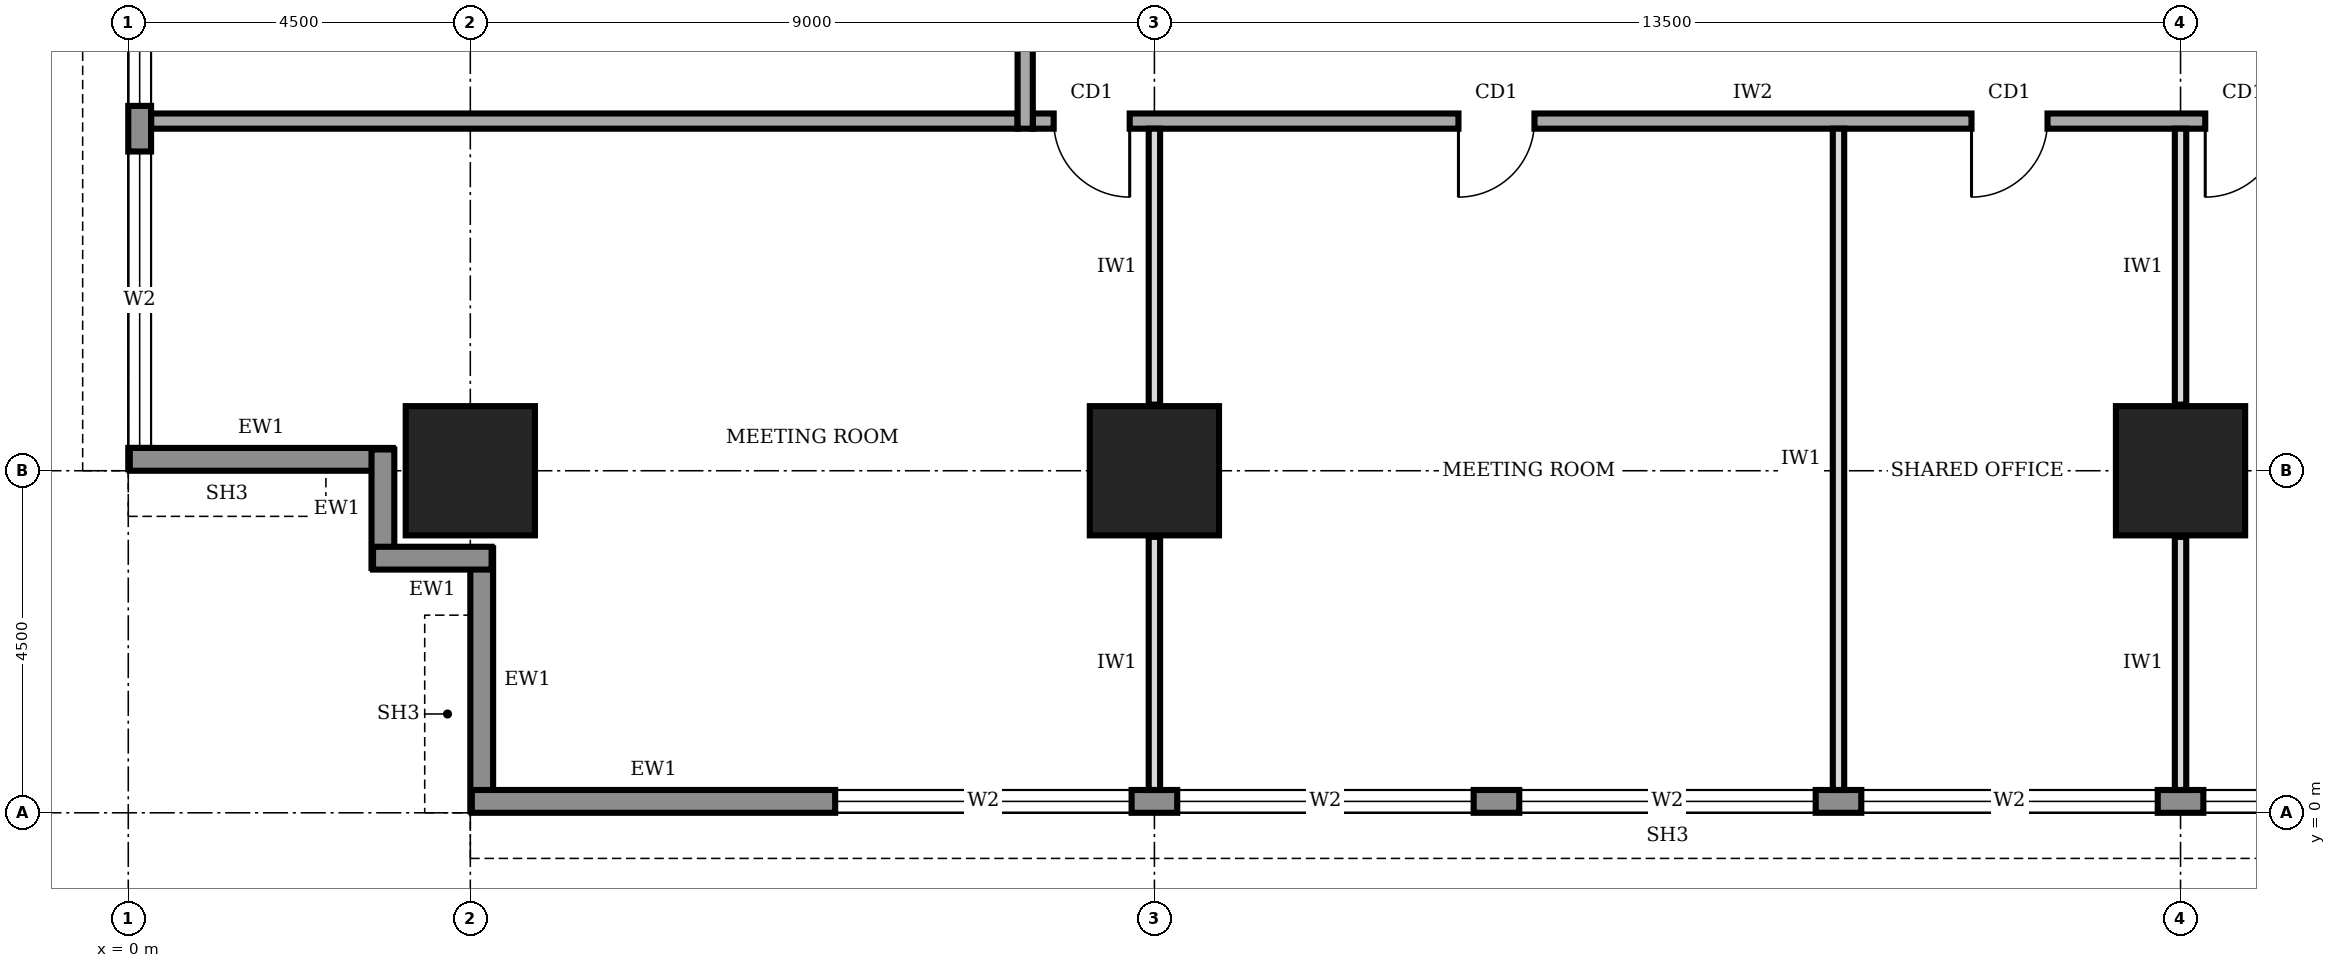
"""IFC4 building model, lengths in metres.
Left out: names, types, materials, properties, quantities, classifications, styles, units other than length and angle.
Written with IfcOpenShell. Run it as: python <this file> out.ifc"""

import sys

from ifc_helpers import new_model, si_unit, direction, frame, frame_2d, origin, origin_2d, place, context, subcontext, project, spatial, rectangle, extrude, element, fill, save


model = new_model("IFC4")
c1 = context("Model", 3, precision=1e-05, world=origin(), true_north=direction((0.0, 1.0)))
c2 = subcontext(c1, "Body", "Model", "MODEL_VIEW")
j1 = project(units=[si_unit("LENGTHUNIT", "METRE"), si_unit("PLANEANGLEUNIT", "RADIAN")], contexts=[c1])
p1 = place(None, origin())
s1 = spatial("IfcSite", under=j1, at=p1, CompositionType="ELEMENT")
p2 = place(p1, origin())
s2 = spatial("IfcBuilding", under=s1, at=p2, CompositionType="ELEMENT")
p3 = place(p2, frame((0.0, 0.0, 137.0)))
s3 = spatial("IfcBuildingStorey", under=s2, at=p3, CompositionType="ELEMENT", Elevation=137.0)
for number, where, z_axis, x_axis in (
    (1, (4.5, 4.5, 0.0), (0.0, 0.0, 1.0), (1.0, 0.0, 0.0)),
    (2, (13.5, 4.5, 0.0), (0.0, 0.0, 1.0), (1.0, 0.0, 0.0)),
    (3, (27.0, 4.5, 0.0), (0.0, 0.0, 1.0), (1.0, 0.0, 0.0)),
):
    element("IfcColumn", number, at=place(p3, frame(where, z_axis=z_axis, x_axis=x_axis)), inside=s3, PredefinedType="COLUMN", context=c2, shape_type="SweptSolid", body=[
        extrude(rectangle(XDim=1.7, YDim=1.7, at=origin_2d()), origin(), (0.0, 0.0, 1.0), 4.0),
    ])
p4 = place(p3, frame((4.65, 3.48, 0.0), z_axis=(0.0, 0.0, 1.0), x_axis=(0.0, -1.0, 0.0)))
e4 = element("IfcWall", 4, at=p4, inside=s3, PredefinedType="STANDARD", context=c2, shape_type="SweptSolid", body=[
    extrude(rectangle(XDim=3.46, YDim=0.3, at=frame_2d((1.73, 0.0))), origin(), (0.0, 0.0, 1.0), 2.85),
])
p5 = place(p3, frame((4.52, 0.15, 0.0), z_axis=(0.0, 0.0, 1.0), x_axis=(1.0, 0.0, 0.0)))
e5 = element("IfcWall", 5, at=p5, inside=s3, PredefinedType="STANDARD", context=c2, shape_type="SweptSolid", body=[
    extrude(rectangle(XDim=31.46, YDim=0.3, at=frame_2d((15.73, 0.0))), origin(), (0.0, 0.0, 1.0), 3.75),
])
p6 = place(p5, frame((4.78, 0.0, 0.6)))
e6 = element("IfcOpeningElement", 6, at=p6, cuts=e5, PredefinedType="OPENING", context=c2, shape_type="SweptSolid", body=[
    extrude(rectangle(XDim=3.9, YDim=2.6, at=frame_2d((1.95, 1.3))), frame((0.0, 0.16, 0.0), z_axis=(0.0, -1.0, 0.0), x_axis=(1.0, 0.0, 0.0)), (0.0, 0.0, 1.0), 0.32),
])
p7 = place(p5, frame((9.28, 0.0, 0.6)))
e7 = element("IfcOpeningElement", 7, at=p7, cuts=e5, PredefinedType="OPENING", context=c2, shape_type="SweptSolid", body=[
    extrude(rectangle(XDim=3.9, YDim=2.6, at=frame_2d((1.95, 1.3))), frame((0.0, 0.16, 0.0), z_axis=(0.0, -1.0, 0.0), x_axis=(1.0, 0.0, 0.0)), (0.0, 0.0, 1.0), 0.32),
])
p8 = place(p5, frame((13.78, 0.0, 0.6)))
e8 = element("IfcOpeningElement", 8, at=p8, cuts=e5, PredefinedType="OPENING", context=c2, shape_type="SweptSolid", body=[
    extrude(rectangle(XDim=3.9, YDim=2.6, at=frame_2d((1.95, 1.3))), frame((0.0, 0.16, 0.0), z_axis=(0.0, -1.0, 0.0), x_axis=(1.0, 0.0, 0.0)), (0.0, 0.0, 1.0), 0.32),
])
p9 = place(p5, frame((18.28, 0.0, 0.6)))
e9 = element("IfcOpeningElement", 9, at=p9, cuts=e5, PredefinedType="OPENING", context=c2, shape_type="SweptSolid", body=[
    extrude(rectangle(XDim=3.9, YDim=2.6, at=frame_2d((1.95, 1.3))), frame((0.0, 0.16, 0.0), z_axis=(0.0, -1.0, 0.0), x_axis=(1.0, 0.0, 0.0)), (0.0, 0.0, 1.0), 0.32),
])
p10 = place(p5, frame((22.78, 0.0, 0.6)))
e10 = element("IfcOpeningElement", 10, at=p10, cuts=e5, PredefinedType="OPENING", context=c2, shape_type="SweptSolid", body=[
    extrude(rectangle(XDim=3.9, YDim=2.6, at=frame_2d((1.95, 1.3))), frame((0.0, 0.16, 0.0), z_axis=(0.0, -1.0, 0.0), x_axis=(1.0, 0.0, 0.0)), (0.0, 0.0, 1.0), 0.32),
])
p11 = place(p5, frame((27.28, 0.0, 0.6)))
e11 = element("IfcOpeningElement", 11, at=p11, cuts=e5, PredefinedType="OPENING", context=c2, shape_type="SweptSolid", body=[
    extrude(rectangle(XDim=3.9, YDim=2.6, at=frame_2d((1.95, 1.3))), frame((0.0, 0.16, 0.0), z_axis=(0.0, -1.0, 0.0), x_axis=(1.0, 0.0, 0.0)), (0.0, 0.0, 1.0), 0.32),
])
p12 = place(p3, frame((0.15, 35.98, 0.0), z_axis=(0.0, 0.0, 1.0), x_axis=(0.0, -1.0, 0.0)))
e12 = element("IfcWall", 12, at=p12, inside=s3, PredefinedType="STANDARD", context=c2, shape_type="SweptSolid", body=[
    extrude(rectangle(XDim=31.46, YDim=0.3, at=frame_2d((15.73, 0.0))), origin(), (0.0, 0.0, 1.0), 3.75),
])
p13 = place(p12, frame((27.28, 0.0, 0.6)))
e13 = element("IfcOpeningElement", 13, at=p13, cuts=e12, PredefinedType="OPENING", context=c2, shape_type="SweptSolid", body=[
    extrude(rectangle(XDim=3.9, YDim=2.6, at=frame_2d((1.95, 1.3))), frame((0.0, 0.16, 0.0), z_axis=(0.0, -1.0, 0.0), x_axis=(1.0, 0.0, 0.0)), (0.0, 0.0, 1.0), 0.32),
])
p14 = place(p12, frame((22.78, 0.0, 0.6)))
e14 = element("IfcOpeningElement", 14, at=p14, cuts=e12, PredefinedType="OPENING", context=c2, shape_type="SweptSolid", body=[
    extrude(rectangle(XDim=3.9, YDim=2.6, at=frame_2d((1.95, 1.3))), frame((0.0, 0.16, 0.0), z_axis=(0.0, -1.0, 0.0), x_axis=(1.0, 0.0, 0.0)), (0.0, 0.0, 1.0), 0.32),
])
p15 = place(p12, frame((18.28, 0.0, 0.6)))
e15 = element("IfcOpeningElement", 15, at=p15, cuts=e12, PredefinedType="OPENING", context=c2, shape_type="SweptSolid", body=[
    extrude(rectangle(XDim=3.9, YDim=2.6, at=frame_2d((1.95, 1.3))), frame((0.0, 0.16, 0.0), z_axis=(0.0, -1.0, 0.0), x_axis=(1.0, 0.0, 0.0)), (0.0, 0.0, 1.0), 0.32),
])
p16 = place(p12, frame((13.78, 0.0, 0.6)))
e16 = element("IfcOpeningElement", 16, at=p16, cuts=e12, PredefinedType="OPENING", context=c2, shape_type="SweptSolid", body=[
    extrude(rectangle(XDim=3.9, YDim=2.6, at=frame_2d((1.95, 1.3))), frame((0.0, 0.16, 0.0), z_axis=(0.0, -1.0, 0.0), x_axis=(1.0, 0.0, 0.0)), (0.0, 0.0, 1.0), 0.32),
])
p17 = place(p12, frame((9.28, 0.0, 0.6)))
e17 = element("IfcOpeningElement", 17, at=p17, cuts=e12, PredefinedType="OPENING", context=c2, shape_type="SweptSolid", body=[
    extrude(rectangle(XDim=3.9, YDim=2.6, at=frame_2d((1.95, 1.3))), frame((0.0, 0.16, 0.0), z_axis=(0.0, -1.0, 0.0), x_axis=(1.0, 0.0, 0.0)), (0.0, 0.0, 1.0), 0.32),
])
p18 = place(p12, frame((4.78, 0.0, 0.6)))
e18 = element("IfcOpeningElement", 18, at=p18, cuts=e12, PredefinedType="OPENING", context=c2, shape_type="SweptSolid", body=[
    extrude(rectangle(XDim=3.9, YDim=2.6, at=frame_2d((1.95, 1.3))), frame((0.0, 0.16, 0.0), z_axis=(0.0, -1.0, 0.0), x_axis=(1.0, 0.0, 0.0)), (0.0, 0.0, 1.0), 0.32),
])
p19 = place(p3, frame((0.02, 4.65, 0.0), z_axis=(0.0, 0.0, 1.0), x_axis=(1.0, 0.0, 0.0)))
e19 = element("IfcWall", 19, at=p19, inside=s3, PredefinedType="STANDARD", context=c2, shape_type="SweptSolid", body=[
    extrude(rectangle(XDim=3.46, YDim=0.3, at=frame_2d((1.73, 0.0))), origin(), (0.0, 0.0, 1.0), 2.85),
])
for number, where, z_axis, x_axis in (
    (20, (3.35, 4.78, 0.0), (0.0, 0.0, 1.0), (0.0, -1.0, 0.0)),
    (21, (3.22, 3.35, 0.0), (0.0, 0.0, 1.0), (1.0, 0.0, 0.0)),
):
    element("IfcWall", number, at=place(p3, frame(where, z_axis=z_axis, x_axis=x_axis)), inside=s3, PredefinedType="STANDARD", context=c2, shape_type="SweptSolid", body=[
        extrude(rectangle(XDim=1.56, YDim=0.3, at=frame_2d((0.78, 0.0))), origin(), (0.0, 0.0, 1.0), 3.75),
    ])
p20 = place(p3, frame((11.9, 9.1, 0.0), z_axis=(0.0, 0.0, 1.0), x_axis=(1.0, 0.0, 0.0)))
e22 = element("IfcWall", 22, at=p20, inside=s3, PredefinedType="SOLIDWALL", context=c2, shape_type="SweptSolid", body=[
    extrude(rectangle(XDim=16.9, YDim=0.2, at=frame_2d((8.45, 0.0))), origin(), (0.0, 0.0, 1.0), 3.75),
])
p21 = place(p20, frame((0.275, 0.0, 0.0)))
e23 = element("IfcOpeningElement", 23, at=p21, cuts=e22, PredefinedType="OPENING", context=c2, shape_type="SweptSolid", body=[
    extrude(rectangle(XDim=1.0, YDim=2.1, at=frame_2d((0.5, 1.05))), frame((0.0, 0.11, 0.0), z_axis=(0.0, -1.0, 0.0), x_axis=(1.0, 0.0, 0.0)), (0.0, 0.0, 1.0), 0.22),
])
p22 = place(p20, frame((5.6, 0.0, 0.0)))
e24 = element("IfcOpeningElement", 24, at=p22, cuts=e22, PredefinedType="OPENING", context=c2, shape_type="SweptSolid", body=[
    extrude(rectangle(XDim=1.0, YDim=2.1, at=frame_2d((0.5, 1.05))), frame((0.0, 0.11, 0.0), z_axis=(0.0, -1.0, 0.0), x_axis=(1.0, 0.0, 0.0)), (0.0, 0.0, 1.0), 0.22),
])
p23 = place(p20, frame((12.35, 0.0, 0.0)))
e25 = element("IfcOpeningElement", 25, at=p23, cuts=e22, PredefinedType="OPENING", context=c2, shape_type="SweptSolid", body=[
    extrude(rectangle(XDim=1.0, YDim=2.1, at=frame_2d((0.5, 1.05))), frame((0.0, 0.11, 0.0), z_axis=(0.0, -1.0, 0.0), x_axis=(1.0, 0.0, 0.0)), (0.0, 0.0, 1.0), 0.22),
])
p24 = place(p20, frame((15.425, 0.0, 0.0)))
e26 = element("IfcOpeningElement", 26, at=p24, cuts=e22, PredefinedType="OPENING", context=c2, shape_type="SweptSolid", body=[
    extrude(rectangle(XDim=1.0, YDim=2.1, at=frame_2d((0.5, 1.05))), frame((0.0, 0.11, 0.0), z_axis=(0.0, -1.0, 0.0), x_axis=(1.0, 0.0, 0.0)), (0.0, 0.0, 1.0), 0.22),
])
p25 = place(p3, frame((11.8, 31.3, 0.0), z_axis=(0.0, 0.0, 1.0), x_axis=(0.0, -1.0, 0.0)))
e27 = element("IfcWall", 27, at=p25, inside=s3, PredefinedType="SOLIDWALL", context=c2, shape_type="SweptSolid", body=[
    extrude(rectangle(XDim=22.3, YDim=0.2, at=frame_2d((11.15, 0.0))), origin(), (0.0, 0.0, 1.0), 3.75),
])
p26 = place(p25, frame((19.55, 0.0, 0.0)))
e28 = element("IfcOpeningElement", 28, at=p26, cuts=e27, PredefinedType="OPENING", context=c2, shape_type="SweptSolid", body=[
    extrude(rectangle(XDim=1.0, YDim=2.1, at=frame_2d((0.5, 1.05))), frame((0.0, 0.11, 0.0), z_axis=(0.0, -1.0, 0.0), x_axis=(1.0, 0.0, 0.0)), (0.0, 0.0, 1.0), 0.22),
])
p27 = place(p25, frame((15.45, 0.0, 0.0)))
e29 = element("IfcOpeningElement", 29, at=p27, cuts=e27, PredefinedType="OPENING", context=c2, shape_type="SweptSolid", body=[
    extrude(rectangle(XDim=0.9, YDim=2.1, at=frame_2d((0.45, 1.05))), frame((0.0, 0.11, 0.0), z_axis=(0.0, -1.0, 0.0), x_axis=(1.0, 0.0, 0.0)), (0.0, 0.0, 1.0), 0.22),
])
p28 = place(p25, frame((12.45, 0.0, 0.0)))
e30 = element("IfcOpeningElement", 30, at=p28, cuts=e27, PredefinedType="OPENING", context=c2, shape_type="SweptSolid", body=[
    extrude(rectangle(XDim=0.9, YDim=2.1, at=frame_2d((0.45, 1.05))), frame((0.0, 0.11, 0.0), z_axis=(0.0, -1.0, 0.0), x_axis=(1.0, 0.0, 0.0)), (0.0, 0.0, 1.0), 0.22),
])
p29 = place(p25, frame((7.6, 0.0, 0.0)))
e31 = element("IfcOpeningElement", 31, at=p29, cuts=e27, PredefinedType="OPENING", context=c2, shape_type="SweptSolid", body=[
    extrude(rectangle(XDim=0.9, YDim=2.1, at=frame_2d((0.45, 1.05))), frame((0.0, 0.11, 0.0), z_axis=(0.0, -1.0, 0.0), x_axis=(1.0, 0.0, 0.0)), (0.0, 0.0, 1.0), 0.22),
])
p30 = place(p25, frame((4.8, 0.0, 0.0)))
e32 = element("IfcOpeningElement", 32, at=p30, cuts=e27, PredefinedType="OPENING", context=c2, shape_type="SweptSolid", body=[
    extrude(rectangle(XDim=1.0, YDim=2.1, at=frame_2d((0.5, 1.05))), frame((0.0, 0.11, 0.0), z_axis=(0.0, -1.0, 0.0), x_axis=(1.0, 0.0, 0.0)), (0.0, 0.0, 1.0), 0.22),
])
p31 = place(p25, frame((10.3, 0.0, 0.0)))
e33 = element("IfcOpeningElement", 33, at=p31, cuts=e27, PredefinedType="OPENING", context=c2, shape_type="SweptSolid", body=[
    extrude(rectangle(XDim=1.0, YDim=2.1, at=frame_2d((0.5, 1.05))), frame((0.0, 0.11, 0.0), z_axis=(0.0, -1.0, 0.0), x_axis=(1.0, 0.0, 0.0)), (0.0, 0.0, 1.0), 0.22),
])
p32 = place(p25, frame((1.55, 0.0, 0.0)))
e34 = element("IfcOpeningElement", 34, at=p32, cuts=e27, PredefinedType="OPENING", context=c2, shape_type="SweptSolid", body=[
    extrude(rectangle(XDim=1.0, YDim=2.1, at=frame_2d((0.5, 1.05))), frame((0.0, 0.11, 0.0), z_axis=(0.0, -1.0, 0.0), x_axis=(1.0, 0.0, 0.0)), (0.0, 0.0, 1.0), 0.22),
])
p33 = place(p3, frame((0.3, 9.1, 0.0), z_axis=(0.0, 0.0, 1.0), x_axis=(1.0, 0.0, 0.0)))
e35 = element("IfcWall", 35, at=p33, inside=s3, PredefinedType="SOLIDWALL", context=c2, shape_type="SweptSolid", body=[
    extrude(rectangle(XDim=11.4, YDim=0.2, at=frame_2d((5.7, 0.0))), origin(), (0.0, 0.0, 1.0), 3.75),
])
p34 = place(p3, frame((13.5, 0.3, 0.0), z_axis=(0.0, 0.0, 1.0), x_axis=(0.0, 1.0, 0.0)))
e36 = element("IfcWall", 36, at=p34, inside=s3, PredefinedType="PARTITIONING", context=c2, shape_type="SweptSolid", body=[
    extrude(rectangle(XDim=3.33, YDim=0.15, at=frame_2d((1.665, 0.0))), origin(), (0.0, 0.0, 1.0), 2.85),
])
p35 = place(p3, frame((13.5, 5.37, 0.0), z_axis=(0.0, 0.0, 1.0), x_axis=(0.0, 1.0, 0.0)))
e37 = element("IfcWall", 37, at=p35, inside=s3, PredefinedType="PARTITIONING", context=c2, shape_type="SweptSolid", body=[
    extrude(rectangle(XDim=3.63, YDim=0.15, at=frame_2d((1.815, 0.0))), origin(), (0.0, 0.0, 1.0), 2.85),
])
p36 = place(p3, frame((22.5, 0.3, 0.0), z_axis=(0.0, 0.0, 1.0), x_axis=(0.0, 1.0, 0.0)))
e38 = element("IfcWall", 38, at=p36, inside=s3, PredefinedType="PARTITIONING", context=c2, shape_type="SweptSolid", body=[
    extrude(rectangle(XDim=8.7, YDim=0.15, at=frame_2d((4.35, 0.0))), origin(), (0.0, 0.0, 1.0), 3.75),
])
p37 = place(p3, frame((27.0, 0.3, 0.0), z_axis=(0.0, 0.0, 1.0), x_axis=(0.0, 1.0, 0.0)))
e39 = element("IfcWall", 39, at=p37, inside=s3, PredefinedType="PARTITIONING", context=c2, shape_type="SweptSolid", body=[
    extrude(rectangle(XDim=3.33, YDim=0.15, at=frame_2d((1.665, 0.0))), origin(), (0.0, 0.0, 1.0), 2.85),
])
p38 = place(p3, frame((27.0, 5.37, 0.0), z_axis=(0.0, 0.0, 1.0), x_axis=(0.0, 1.0, 0.0)))
e40 = element("IfcWall", 40, at=p38, inside=s3, PredefinedType="PARTITIONING", context=c2, shape_type="SweptSolid", body=[
    extrude(rectangle(XDim=3.63, YDim=0.15, at=frame_2d((1.815, 0.0))), origin(), (0.0, 0.0, 1.0), 2.85),
])
p39 = place(p6, origin())
e41 = element("IfcWindow", 41, at=p39, inside=s3, PartitioningType="SINGLE_PANEL", PredefinedType="WINDOW", context=c2, shape_type="SweptSolid", body=[
    extrude(rectangle(XDim=3.9, YDim=2.6, at=frame_2d((1.95, 1.3))), frame((0.0, 0.03, 0.0), z_axis=(0.0, -1.0, 0.0), x_axis=(1.0, 0.0, 0.0)), (0.0, 0.0, 1.0), 0.06),
])
fill(e6, e41)
p40 = place(p7, origin())
e42 = element("IfcWindow", 42, at=p40, inside=s3, PartitioningType="SINGLE_PANEL", PredefinedType="WINDOW", context=c2, shape_type="SweptSolid", body=[
    extrude(rectangle(XDim=3.9, YDim=2.6, at=frame_2d((1.95, 1.3))), frame((0.0, 0.03, 0.0), z_axis=(0.0, -1.0, 0.0), x_axis=(1.0, 0.0, 0.0)), (0.0, 0.0, 1.0), 0.06),
])
fill(e7, e42)
p41 = place(p8, origin())
e43 = element("IfcWindow", 43, at=p41, inside=s3, PartitioningType="SINGLE_PANEL", PredefinedType="WINDOW", context=c2, shape_type="SweptSolid", body=[
    extrude(rectangle(XDim=3.9, YDim=2.6, at=frame_2d((1.95, 1.3))), frame((0.0, 0.03, 0.0), z_axis=(0.0, -1.0, 0.0), x_axis=(1.0, 0.0, 0.0)), (0.0, 0.0, 1.0), 0.06),
])
fill(e8, e43)
p42 = place(p9, origin())
e44 = element("IfcWindow", 44, at=p42, inside=s3, PartitioningType="SINGLE_PANEL", PredefinedType="WINDOW", context=c2, shape_type="SweptSolid", body=[
    extrude(rectangle(XDim=3.9, YDim=2.6, at=frame_2d((1.95, 1.3))), frame((0.0, 0.03, 0.0), z_axis=(0.0, -1.0, 0.0), x_axis=(1.0, 0.0, 0.0)), (0.0, 0.0, 1.0), 0.06),
])
fill(e9, e44)
p43 = place(p10, origin())
e45 = element("IfcWindow", 45, at=p43, inside=s3, PartitioningType="SINGLE_PANEL", PredefinedType="WINDOW", context=c2, shape_type="SweptSolid", body=[
    extrude(rectangle(XDim=3.9, YDim=2.6, at=frame_2d((1.95, 1.3))), frame((0.0, 0.03, 0.0), z_axis=(0.0, -1.0, 0.0), x_axis=(1.0, 0.0, 0.0)), (0.0, 0.0, 1.0), 0.06),
])
fill(e10, e45)
p44 = place(p13, origin())
e46 = element("IfcWindow", 46, at=p44, inside=s3, PartitioningType="SINGLE_PANEL", PredefinedType="WINDOW", context=c2, shape_type="SweptSolid", body=[
    extrude(rectangle(XDim=3.9, YDim=2.6, at=frame_2d((1.95, 1.3))), frame((0.0, 0.03, 0.0), z_axis=(0.0, -1.0, 0.0), x_axis=(1.0, 0.0, 0.0)), (0.0, 0.0, 1.0), 0.06),
])
fill(e13, e46)
p45 = place(p14, origin())
e47 = element("IfcWindow", 47, at=p45, inside=s3, PartitioningType="SINGLE_PANEL", PredefinedType="WINDOW", context=c2, shape_type="SweptSolid", body=[
    extrude(rectangle(XDim=3.9, YDim=2.6, at=frame_2d((1.95, 1.3))), frame((0.0, 0.03, 0.0), z_axis=(0.0, -1.0, 0.0), x_axis=(1.0, 0.0, 0.0)), (0.0, 0.0, 1.0), 0.06),
])
fill(e14, e47)
p46 = place(p21, frame((1.0, 0.0, 0.0), z_axis=(0.0, 0.0, 1.0), x_axis=(-1.0, 0.0, 0.0)))
e48 = element("IfcDoor", 48, at=p46, inside=s3, OperationType="SINGLE_SWING_LEFT", PredefinedType="DOOR", context=c2, shape_type="SweptSolid", body=[
    extrude(rectangle(XDim=1.0, YDim=2.1, at=frame_2d((0.5, 1.05))), frame((0.0, 0.025, 0.0), z_axis=(0.0, -1.0, 0.0), x_axis=(1.0, 0.0, 0.0)), (0.0, 0.0, 1.0), 0.05),
])
fill(e23, e48)
p47 = place(p22, frame((1.0, 0.0, 0.0), z_axis=(0.0, 0.0, 1.0), x_axis=(-1.0, 0.0, 0.0)))
e49 = element("IfcDoor", 49, at=p47, inside=s3, OperationType="SINGLE_SWING_RIGHT", PredefinedType="DOOR", context=c2, shape_type="SweptSolid", body=[
    extrude(rectangle(XDim=1.0, YDim=2.1, at=frame_2d((0.5, 1.05))), frame((0.0, 0.025, 0.0), z_axis=(0.0, -1.0, 0.0), x_axis=(1.0, 0.0, 0.0)), (0.0, 0.0, 1.0), 0.05),
])
fill(e24, e49)
p48 = place(p23, frame((1.0, 0.0, 0.0), z_axis=(0.0, 0.0, 1.0), x_axis=(-1.0, 0.0, 0.0)))
e50 = element("IfcDoor", 50, at=p48, inside=s3, OperationType="SINGLE_SWING_RIGHT", PredefinedType="DOOR", context=c2, shape_type="SweptSolid", body=[
    extrude(rectangle(XDim=1.0, YDim=2.1, at=frame_2d((0.5, 1.05))), frame((0.0, 0.025, 0.0), z_axis=(0.0, -1.0, 0.0), x_axis=(1.0, 0.0, 0.0)), (0.0, 0.0, 1.0), 0.05),
])
fill(e25, e50)
p49 = place(p24, frame((1.0, 0.0, 0.0), z_axis=(0.0, 0.0, 1.0), x_axis=(-1.0, 0.0, 0.0)))
e51 = element("IfcDoor", 51, at=p49, inside=s3, OperationType="SINGLE_SWING_RIGHT", PredefinedType="DOOR", context=c2, shape_type="SweptSolid", body=[
    extrude(rectangle(XDim=1.0, YDim=2.1, at=frame_2d((0.5, 1.05))), frame((0.0, 0.025, 0.0), z_axis=(0.0, -1.0, 0.0), x_axis=(1.0, 0.0, 0.0)), (0.0, 0.0, 1.0), 0.05),
])
fill(e26, e51)
save(model, sys.argv[1])
